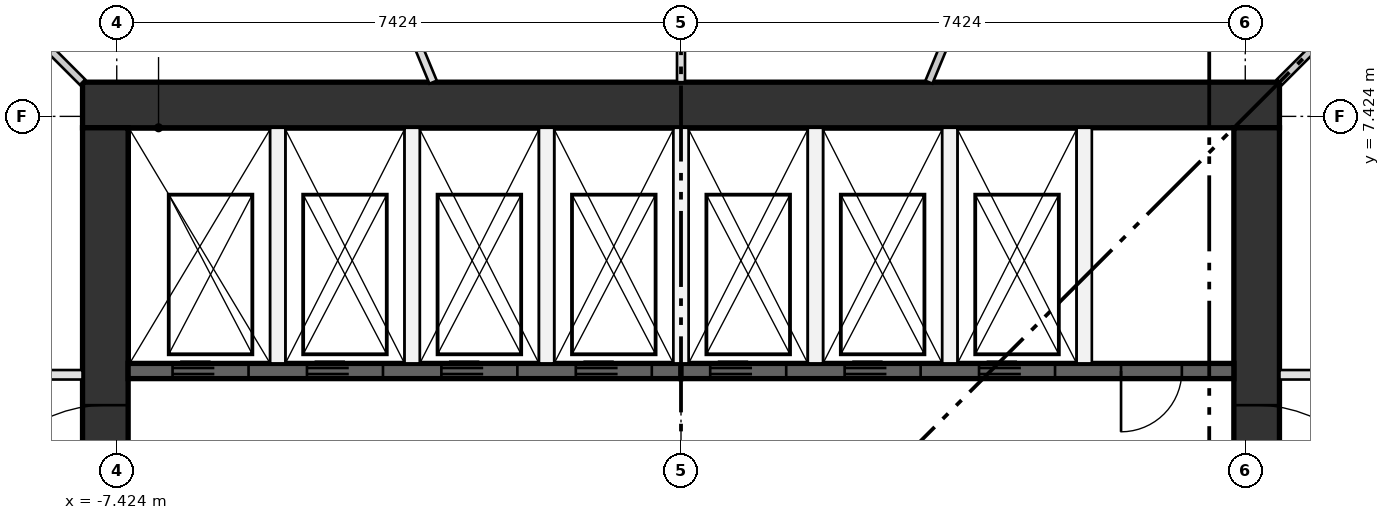
"""IFC4 building model, lengths in metres.
Left out: names, types, materials, properties, quantities, classifications, styles, units other than length and angle.
Written with IfcOpenShell. Run it as: python <this file> out.ifc"""

import sys

from ifc_helpers import new_model, si_unit, direction, frame, frame_2d, origin, place, context, subcontext, project, spatial, rectangle, extrude, element, fill, save


model = new_model("IFC4")
c1 = context("Model", 3, precision=1e-05, world=origin(), true_north=direction((0.0, 1.0)))
c2 = subcontext(c1, "Body", "Model", "MODEL_VIEW")
j1 = project(units=[si_unit("LENGTHUNIT", "METRE"), si_unit("PLANEANGLEUNIT", "RADIAN")], contexts=[c1])
p1 = place(None, origin())
s1 = spatial("IfcSite", under=j1, at=p1, CompositionType="ELEMENT")
p2 = place(p1, origin())
s2 = spatial("IfcBuilding", under=s1, at=p2, CompositionType="ELEMENT")
p3 = place(p2, frame((0.0, 0.0, 154.45)))
s3 = spatial("IfcBuildingStorey", under=s2, at=p3, CompositionType="ELEMENT", Elevation=154.45)
p4 = place(p3, frame((-7.874, 7.574, 0.0), z_axis=(0.0, 0.0, 1.0), x_axis=(1.0, 0.0, 0.0)))
e1 = element("IfcWall", 1, at=p4, inside=s3, PredefinedType="SHEAR", context=c2, shape_type="SweptSolid", body=[
    extrude(rectangle(XDim=15.748, YDim=0.6, at=frame_2d((7.874, 0.0))), origin(), (0.0, 0.0, 1.0), 3.35),
])
p5 = place(p3, frame((-7.574, -7.274, 0.0), z_axis=(0.0, 0.0, 1.0), x_axis=(0.0, 1.0, 0.0)))
e2 = element("IfcWall", 2, at=p5, inside=s3, PredefinedType="SHEAR", context=c2, shape_type="SweptSolid", body=[
    extrude(rectangle(XDim=14.548, YDim=0.6, at=frame_2d((7.274, 0.0))), origin(), (0.0, 0.0, 1.0), 3.35),
])
p6 = place(p5, frame((6.774, 0.0, 0.0)))
e3 = element("IfcOpeningElement", 3, at=p6, cuts=e2, PredefinedType="OPENING", context=c2, shape_type="SweptSolid", body=[
    extrude(rectangle(XDim=1.0, YDim=2.1, at=frame_2d((0.5, 1.05))), frame((0.0, 0.31, 0.0), z_axis=(0.0, -1.0, 0.0), x_axis=(1.0, 0.0, 0.0)), (0.0, 0.0, 1.0), 0.62),
])
p7 = place(p5, frame((3.649, 0.0, 0.0)))
e4 = element("IfcOpeningElement", 4, at=p7, cuts=e2, PredefinedType="OPENING", context=c2, shape_type="SweptSolid", body=[
    extrude(rectangle(XDim=1.8, YDim=2.1, at=frame_2d((0.9, 1.05))), frame((0.0, 0.31, 0.0), z_axis=(0.0, -1.0, 0.0), x_axis=(1.0, 0.0, 0.0)), (0.0, 0.0, 1.0), 0.62),
])
p8 = place(p5, frame((9.098, 0.0, 0.0)))
e5 = element("IfcOpeningElement", 5, at=p8, cuts=e2, PredefinedType="OPENING", context=c2, shape_type="SweptSolid", body=[
    extrude(rectangle(XDim=1.8, YDim=2.1, at=frame_2d((0.9, 1.05))), frame((0.0, 0.31, 0.0), z_axis=(0.0, -1.0, 0.0), x_axis=(1.0, 0.0, 0.0)), (0.0, 0.0, 1.0), 0.62),
])
p9 = place(p3, frame((7.574, -7.274, 0.0), z_axis=(0.0, 0.0, 1.0), x_axis=(0.0, 1.0, 0.0)))
e6 = element("IfcWall", 6, at=p9, inside=s3, PredefinedType="SHEAR", context=c2, shape_type="SweptSolid", body=[
    extrude(rectangle(XDim=14.548, YDim=0.6, at=frame_2d((7.274, 0.0))), origin(), (0.0, 0.0, 1.0), 3.35),
])
p10 = place(p9, frame((6.774, 0.0, 0.0)))
e7 = element("IfcOpeningElement", 7, at=p10, cuts=e6, PredefinedType="OPENING", context=c2, shape_type="SweptSolid", body=[
    extrude(rectangle(XDim=1.0, YDim=2.1, at=frame_2d((0.5, 1.05))), frame((0.0, 0.31, 0.0), z_axis=(0.0, -1.0, 0.0), x_axis=(1.0, 0.0, 0.0)), (0.0, 0.0, 1.0), 0.62),
])
p11 = place(p9, frame((3.649, 0.0, 0.0)))
e8 = element("IfcOpeningElement", 8, at=p11, cuts=e6, PredefinedType="OPENING", context=c2, shape_type="SweptSolid", body=[
    extrude(rectangle(XDim=1.8, YDim=2.1, at=frame_2d((0.9, 1.05))), frame((0.0, 0.31, 0.0), z_axis=(0.0, -1.0, 0.0), x_axis=(1.0, 0.0, 0.0)), (0.0, 0.0, 1.0), 0.62),
])
p12 = place(p9, frame((9.098, 0.0, 0.0)))
e9 = element("IfcOpeningElement", 9, at=p12, cuts=e6, PredefinedType="OPENING", context=c2, shape_type="SweptSolid", body=[
    extrude(rectangle(XDim=1.8, YDim=2.1, at=frame_2d((0.9, 1.05))), frame((0.0, 0.31, 0.0), z_axis=(0.0, -1.0, 0.0), x_axis=(1.0, 0.0, 0.0)), (0.0, 0.0, 1.0), 0.62),
])
p13 = place(p3, frame((-7.274, 4.074, 0.0), z_axis=(0.0, 0.0, 1.0), x_axis=(1.0, 0.0, 0.0)))
e10 = element("IfcWall", 10, at=p13, inside=s3, PredefinedType="SHEAR", context=c2, shape_type="SweptSolid", body=[
    extrude(rectangle(XDim=7.274, YDim=0.2, at=frame_2d((3.637, 0.0))), origin(), (0.0, 0.0, 1.0), 3.0),
])
p14 = place(p13, frame((0.584, 0.0, 0.0)))
e11 = element("IfcOpeningElement", 11, at=p14, cuts=e10, PredefinedType="OPENING", context=c2, shape_type="SweptSolid", body=[
    extrude(rectangle(XDim=1.0, YDim=2.1, at=frame_2d((0.5, 1.05))), frame((0.0, 0.11, 0.0), z_axis=(0.0, -1.0, 0.0), x_axis=(1.0, 0.0, 0.0)), (0.0, 0.0, 1.0), 0.22),
])
p15 = place(p13, frame((2.353, 0.0, 0.0)))
e12 = element("IfcOpeningElement", 12, at=p15, cuts=e10, PredefinedType="OPENING", context=c2, shape_type="SweptSolid", body=[
    extrude(rectangle(XDim=1.0, YDim=2.1, at=frame_2d((0.5, 1.05))), frame((0.0, 0.11, 0.0), z_axis=(0.0, -1.0, 0.0), x_axis=(1.0, 0.0, 0.0)), (0.0, 0.0, 1.0), 0.22),
])
p16 = place(p13, frame((4.121, 0.0, 0.0)))
e13 = element("IfcOpeningElement", 13, at=p16, cuts=e10, PredefinedType="OPENING", context=c2, shape_type="SweptSolid", body=[
    extrude(rectangle(XDim=1.0, YDim=2.1, at=frame_2d((0.5, 1.05))), frame((0.0, 0.11, 0.0), z_axis=(0.0, -1.0, 0.0), x_axis=(1.0, 0.0, 0.0)), (0.0, 0.0, 1.0), 0.22),
])
p17 = place(p13, frame((5.89, 0.0, 0.0)))
e14 = element("IfcOpeningElement", 14, at=p17, cuts=e10, PredefinedType="OPENING", context=c2, shape_type="SweptSolid", body=[
    extrude(rectangle(XDim=1.0, YDim=2.1, at=frame_2d((0.5, 1.05))), frame((0.0, 0.11, 0.0), z_axis=(0.0, -1.0, 0.0), x_axis=(1.0, 0.0, 0.0)), (0.0, 0.0, 1.0), 0.22),
])
p18 = place(p3, frame((0.0, 4.074, 0.0), z_axis=(0.0, 0.0, 1.0), x_axis=(1.0, 0.0, 0.0)))
e15 = element("IfcWall", 15, at=p18, inside=s3, PredefinedType="SHEAR", context=c2, shape_type="SweptSolid", body=[
    extrude(rectangle(XDim=7.274, YDim=0.2, at=frame_2d((3.637, 0.0))), origin(), (0.0, 0.0, 1.0), 3.0),
])
p19 = place(p18, frame((0.384, 0.0, 0.0)))
e16 = element("IfcOpeningElement", 16, at=p19, cuts=e15, PredefinedType="OPENING", context=c2, shape_type="SweptSolid", body=[
    extrude(rectangle(XDim=1.0, YDim=2.1, at=frame_2d((0.5, 1.05))), frame((0.0, 0.11, 0.0), z_axis=(0.0, -1.0, 0.0), x_axis=(1.0, 0.0, 0.0)), (0.0, 0.0, 1.0), 0.22),
])
p20 = place(p18, frame((2.153, 0.0, 0.0)))
e17 = element("IfcOpeningElement", 17, at=p20, cuts=e15, PredefinedType="OPENING", context=c2, shape_type="SweptSolid", body=[
    extrude(rectangle(XDim=1.0, YDim=2.1, at=frame_2d((0.5, 1.05))), frame((0.0, 0.11, 0.0), z_axis=(0.0, -1.0, 0.0), x_axis=(1.0, 0.0, 0.0)), (0.0, 0.0, 1.0), 0.22),
])
p21 = place(p18, frame((3.921, 0.0, 0.0)))
e18 = element("IfcOpeningElement", 18, at=p21, cuts=e15, PredefinedType="OPENING", context=c2, shape_type="SweptSolid", body=[
    extrude(rectangle(XDim=1.0, YDim=2.1, at=frame_2d((0.5, 1.05))), frame((0.0, 0.11, 0.0), z_axis=(0.0, -1.0, 0.0), x_axis=(1.0, 0.0, 0.0)), (0.0, 0.0, 1.0), 0.22),
])
p22 = place(p18, frame((5.79, 0.0, 0.0)))
e19 = element("IfcOpeningElement", 19, at=p22, cuts=e15, PredefinedType="OPENING", context=c2, shape_type="SweptSolid", body=[
    extrude(rectangle(XDim=0.8, YDim=2.1, at=frame_2d((0.4, 1.05))), frame((0.0, 0.11, 0.0), z_axis=(0.0, -1.0, 0.0), x_axis=(1.0, 0.0, 0.0)), (0.0, 0.0, 1.0), 0.22),
])
for number, where, z_axis, x_axis in (
    (20, (-5.305, 4.174, 0.0), (0.0, 0.0, 1.0), (0.0, 1.0, 0.0)),
    (21, (-3.537, 4.174, 0.0), (0.0, 0.0, 1.0), (0.0, 1.0, 0.0)),
    (22, (-1.769, 4.174, 0.0), (0.0, 0.0, 1.0), (0.0, 1.0, 0.0)),
    (23, (0.0, 4.174, 0.0), (0.0, 0.0, 1.0), (0.0, 1.0, 0.0)),
    (24, (1.769, 4.174, 0.0), (0.0, 0.0, 1.0), (0.0, 1.0, 0.0)),
    (25, (3.537, 4.174, 0.0), (0.0, 0.0, 1.0), (0.0, 1.0, 0.0)),
    (26, (5.305, 4.174, 0.0), (0.0, 0.0, 1.0), (0.0, 1.0, 0.0)),
):
    element("IfcWall", number, at=place(p3, frame(where, z_axis=z_axis, x_axis=x_axis)), inside=s3, PredefinedType="PARTITIONING", context=c2, shape_type="SweptSolid", body=[
        extrude(rectangle(XDim=3.1, YDim=0.2, at=frame_2d((1.55, 0.0))), origin(), (0.0, 0.0, 1.0), 3.0),
    ])
p23 = place(p3, frame((7.874, 4.024, 0.0), z_axis=(0.0, 0.0, 1.0), x_axis=(1.0, 0.0, 0.0)))
e27 = element("IfcWall", 27, at=p23, inside=s3, PredefinedType="PARTITIONING", context=c2, shape_type="SweptSolid", body=[
    extrude(rectangle(XDim=5.036, YDim=0.125, at=frame_2d((2.518, 0.0))), origin(), (0.0, 0.0, 1.0), 3.0),
])
p24 = place(p23, frame((2.0, 0.0, 0.0)))
e28 = element("IfcOpeningElement", 28, at=p24, cuts=e27, PredefinedType="OPENING", context=c2, shape_type="SweptSolid", body=[
    extrude(rectangle(XDim=1.0, YDim=2.1, at=frame_2d((0.5, 1.05))), frame((0.0, 0.073, 0.0), z_axis=(0.0, -1.0, 0.0), x_axis=(1.0, 0.0, 0.0)), (0.0, 0.0, 1.0), 0.145),
])
p25 = place(p3, frame((-11.645, 4.024, 0.0), z_axis=(0.0, 0.0, 1.0), x_axis=(1.0, 0.0, 0.0)))
e29 = element("IfcWall", 29, at=p25, inside=s3, PredefinedType="PARTITIONING", context=c2, shape_type="SweptSolid", body=[
    extrude(rectangle(XDim=3.771, YDim=0.125, at=frame_2d((1.886, 0.0))), origin(), (0.0, 0.0, 1.0), 3.0),
])
p26 = place(p25, frame((1.4, 0.0, 0.0)))
e30 = element("IfcOpeningElement", 30, at=p26, cuts=e29, PredefinedType="OPENING", context=c2, shape_type="SweptSolid", body=[
    extrude(rectangle(XDim=1.0, YDim=2.1, at=frame_2d((0.5, 1.05))), frame((0.0, 0.073, 0.0), z_axis=(0.0, -1.0, 0.0), x_axis=(1.0, 0.0, 0.0)), (0.0, 0.0, 1.0), 0.145),
])
p27 = place(p3, frame((7.874, 7.874, 0.0), z_axis=(0.0, 0.0, 1.0), x_axis=(0.707106781187, 0.707106781187, 0.0)))
e31 = element("IfcWall", 31, at=p27, inside=s3, PredefinedType="PARTITIONING", context=c2, shape_type="SweptSolid", body=[
    extrude(rectangle(XDim=6.564, YDim=0.1, at=frame_2d((3.282, 0.0))), origin(), (0.0, 0.0, 1.0), 3.0),
])
p28 = place(p27, frame((2.5, 0.0, 0.0)))
e32 = element("IfcOpeningElement", 32, at=p28, cuts=e31, PredefinedType="OPENING", context=c2, shape_type="SweptSolid", body=[
    extrude(rectangle(XDim=1.0, YDim=2.1, at=frame_2d((0.5, 1.05))), frame((0.0, 0.06, 0.0), z_axis=(0.0, -1.0, 0.0), x_axis=(1.0, 0.0, 0.0)), (0.0, 0.0, 1.0), 0.12),
])
p29 = place(p3, frame((3.261, 7.874, 0.0), z_axis=(0.0, 0.0, 1.0), x_axis=(0.382691869474, 0.923876037701, 0.0)))
e33 = element("IfcWall", 33, at=p29, inside=s3, PredefinedType="PARTITIONING", context=c2, shape_type="SweptSolid", body=[
    extrude(rectangle(XDim=4.607, YDim=0.1, at=frame_2d((2.304, 0.0))), origin(), (0.0, 0.0, 1.0), 3.0),
])
p30 = place(p29, frame((1.8, 0.0, 0.0)))
e34 = element("IfcOpeningElement", 34, at=p30, cuts=e33, PredefinedType="OPENING", context=c2, shape_type="SweptSolid", body=[
    extrude(rectangle(XDim=1.0, YDim=2.1, at=frame_2d((0.5, 1.05))), frame((0.0, 0.06, 0.0), z_axis=(0.0, -1.0, 0.0), x_axis=(1.0, 0.0, 0.0)), (0.0, 0.0, 1.0), 0.12),
])
p31 = place(p3, frame((0.0, 7.874, 0.0), z_axis=(0.0, 0.0, 1.0), x_axis=(0.0, 1.0, 0.0)))
e35 = element("IfcWall", 35, at=p31, inside=s3, PredefinedType="PARTITIONING", context=c2, shape_type="SweptSolid", body=[
    extrude(rectangle(XDim=5.256, YDim=0.105, at=frame_2d((2.628, 0.0))), origin(), (0.0, 0.0, 1.0), 3.0),
])
p32 = place(p31, frame((2.1, 0.0, 0.0)))
e36 = element("IfcOpeningElement", 36, at=p32, cuts=e35, PredefinedType="OPENING", context=c2, shape_type="SweptSolid", body=[
    extrude(rectangle(XDim=1.0, YDim=2.1, at=frame_2d((0.5, 1.05))), frame((0.0, 0.062, 0.0), z_axis=(0.0, -1.0, 0.0), x_axis=(1.0, 0.0, 0.0)), (0.0, 0.0, 1.0), 0.125),
])
p33 = place(p3, frame((-3.261, 7.874, 0.0), z_axis=(0.0, 0.0, 1.0), x_axis=(-0.382691869474, 0.923876037701, 0.0)))
e37 = element("IfcWall", 37, at=p33, inside=s3, PredefinedType="PARTITIONING", context=c2, shape_type="SweptSolid", body=[
    extrude(rectangle(XDim=4.607, YDim=0.105, at=frame_2d((2.304, 0.0))), origin(), (0.0, 0.0, 1.0), 3.0),
])
p34 = place(p3, frame((-12.516, 12.516, 0.0), z_axis=(0.0, 0.0, 1.0), x_axis=(0.707106781187, -0.707106781187, 0.0)))
e38 = element("IfcWall", 38, at=p34, inside=s3, PredefinedType="PARTITIONING", context=c2, shape_type="SweptSolid", body=[
    extrude(rectangle(XDim=6.564, YDim=0.1, at=frame_2d((3.282, 0.0))), origin(), (0.0, 0.0, 1.0), 3.0),
])
p35 = place(p34, frame((3.0, 0.0, 0.0)))
e39 = element("IfcOpeningElement", 39, at=p35, cuts=e38, PredefinedType="OPENING", context=c2, shape_type="SweptSolid", body=[
    extrude(rectangle(XDim=1.0, YDim=2.1, at=frame_2d((0.5, 1.05))), frame((0.0, 0.06, 0.0), z_axis=(0.0, -1.0, 0.0), x_axis=(1.0, 0.0, 0.0)), (0.0, 0.0, 1.0), 0.12),
])
p36 = place(p14, frame((1.0, 0.0, 0.0), z_axis=(0.0, 0.0, 1.0), x_axis=(-1.0, 0.0, 0.0)))
e40 = element("IfcDoor", 40, at=p36, inside=s3, OperationType="DOUBLE_DOOR_SLIDING", PredefinedType="DOOR", context=c2, shape_type="SweptSolid", body=[
    extrude(rectangle(XDim=1.0, YDim=2.1, at=frame_2d((0.5, 1.05))), frame((0.0, 0.025, 0.0), z_axis=(0.0, -1.0, 0.0), x_axis=(1.0, 0.0, 0.0)), (0.0, 0.0, 1.0), 0.05),
])
fill(e11, e40)
p37 = place(p15, frame((1.0, 0.0, 0.0), z_axis=(0.0, 0.0, 1.0), x_axis=(-1.0, 0.0, 0.0)))
e41 = element("IfcDoor", 41, at=p37, inside=s3, OperationType="DOUBLE_DOOR_SLIDING", PredefinedType="DOOR", context=c2, shape_type="SweptSolid", body=[
    extrude(rectangle(XDim=1.0, YDim=2.1, at=frame_2d((0.5, 1.05))), frame((0.0, 0.025, 0.0), z_axis=(0.0, -1.0, 0.0), x_axis=(1.0, 0.0, 0.0)), (0.0, 0.0, 1.0), 0.05),
])
fill(e12, e41)
p38 = place(p16, frame((1.0, 0.0, 0.0), z_axis=(0.0, 0.0, 1.0), x_axis=(-1.0, 0.0, 0.0)))
e42 = element("IfcDoor", 42, at=p38, inside=s3, OperationType="DOUBLE_DOOR_SLIDING", PredefinedType="DOOR", context=c2, shape_type="SweptSolid", body=[
    extrude(rectangle(XDim=1.0, YDim=2.1, at=frame_2d((0.5, 1.05))), frame((0.0, 0.025, 0.0), z_axis=(0.0, -1.0, 0.0), x_axis=(1.0, 0.0, 0.0)), (0.0, 0.0, 1.0), 0.05),
])
fill(e13, e42)
p39 = place(p17, frame((1.0, 0.0, 0.0), z_axis=(0.0, 0.0, 1.0), x_axis=(-1.0, 0.0, 0.0)))
e43 = element("IfcDoor", 43, at=p39, inside=s3, OperationType="DOUBLE_DOOR_SLIDING", PredefinedType="DOOR", context=c2, shape_type="SweptSolid", body=[
    extrude(rectangle(XDim=1.0, YDim=2.1, at=frame_2d((0.5, 1.05))), frame((0.0, 0.025, 0.0), z_axis=(0.0, -1.0, 0.0), x_axis=(1.0, 0.0, 0.0)), (0.0, 0.0, 1.0), 0.05),
])
fill(e14, e43)
p40 = place(p19, frame((1.0, 0.0, 0.0), z_axis=(0.0, 0.0, 1.0), x_axis=(-1.0, 0.0, 0.0)))
e44 = element("IfcDoor", 44, at=p40, inside=s3, OperationType="DOUBLE_DOOR_SLIDING", PredefinedType="DOOR", context=c2, shape_type="SweptSolid", body=[
    extrude(rectangle(XDim=1.0, YDim=2.1, at=frame_2d((0.5, 1.05))), frame((0.0, 0.025, 0.0), z_axis=(0.0, -1.0, 0.0), x_axis=(1.0, 0.0, 0.0)), (0.0, 0.0, 1.0), 0.05),
])
fill(e16, e44)
p41 = place(p20, frame((1.0, 0.0, 0.0), z_axis=(0.0, 0.0, 1.0), x_axis=(-1.0, 0.0, 0.0)))
e45 = element("IfcDoor", 45, at=p41, inside=s3, OperationType="DOUBLE_DOOR_SLIDING", PredefinedType="DOOR", context=c2, shape_type="SweptSolid", body=[
    extrude(rectangle(XDim=1.0, YDim=2.1, at=frame_2d((0.5, 1.05))), frame((0.0, 0.025, 0.0), z_axis=(0.0, -1.0, 0.0), x_axis=(1.0, 0.0, 0.0)), (0.0, 0.0, 1.0), 0.05),
])
fill(e17, e45)
p42 = place(p21, frame((1.0, 0.0, 0.0), z_axis=(0.0, 0.0, 1.0), x_axis=(-1.0, 0.0, 0.0)))
e46 = element("IfcDoor", 46, at=p42, inside=s3, OperationType="DOUBLE_DOOR_SLIDING", PredefinedType="DOOR", context=c2, shape_type="SweptSolid", body=[
    extrude(rectangle(XDim=1.0, YDim=2.1, at=frame_2d((0.5, 1.05))), frame((0.0, 0.025, 0.0), z_axis=(0.0, -1.0, 0.0), x_axis=(1.0, 0.0, 0.0)), (0.0, 0.0, 1.0), 0.05),
])
fill(e18, e46)
p43 = place(p22, frame((0.8, 0.0, 0.0), z_axis=(0.0, 0.0, 1.0), x_axis=(-1.0, 0.0, 0.0)))
e47 = element("IfcDoor", 47, at=p43, inside=s3, OperationType="SINGLE_SWING_LEFT", PredefinedType="DOOR", context=c2, shape_type="SweptSolid", body=[
    extrude(rectangle(XDim=0.8, YDim=2.1, at=frame_2d((0.4, 1.05))), frame((0.0, 0.025, 0.0), z_axis=(0.0, -1.0, 0.0), x_axis=(1.0, 0.0, 0.0)), (0.0, 0.0, 1.0), 0.05),
])
fill(e19, e47)
p44 = place(p8, origin())
e48 = element("IfcDoor", 48, at=p44, inside=s3, OperationType="DOUBLE_DOOR_SINGLE_SWING", PredefinedType="DOOR", context=c2, shape_type="SweptSolid", body=[
    extrude(rectangle(XDim=1.8, YDim=2.1, at=frame_2d((0.9, 1.05))), frame((0.0, 0.025, 0.0), z_axis=(0.0, -1.0, 0.0), x_axis=(1.0, 0.0, 0.0)), (0.0, 0.0, 1.0), 0.05),
])
fill(e5, e48)
p45 = place(p12, frame((1.8, 0.0, 0.0), z_axis=(0.0, 0.0, 1.0), x_axis=(-1.0, 0.0, 0.0)))
e49 = element("IfcDoor", 49, at=p45, inside=s3, OperationType="DOUBLE_DOOR_SINGLE_SWING", PredefinedType="DOOR", context=c2, shape_type="SweptSolid", body=[
    extrude(rectangle(XDim=1.8, YDim=2.1, at=frame_2d((0.9, 1.05))), frame((0.0, 0.025, 0.0), z_axis=(0.0, -1.0, 0.0), x_axis=(1.0, 0.0, 0.0)), (0.0, 0.0, 1.0), 0.05),
])
fill(e9, e49)
save(model, sys.argv[1])
